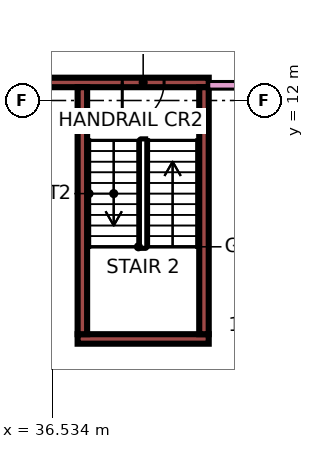
"""IFC4 building model, lengths in metres.
Left out: names, types, materials, properties, quantities, classifications, styles, units other than length and angle.
Written with IfcOpenShell. Run it as: python <this file> out.ifc"""

import sys

from ifc_helpers import new_model, si_unit, direction, frame, frame_2d, origin, place, context, subcontext, project, spatial, rectangle, extrude, element, fill, save


model = new_model("IFC4")
c1 = context("Model", 3, precision=1e-05, world=origin(), true_north=direction((0.0, 1.0)))
c2 = subcontext(c1, "Body", "Model", "MODEL_VIEW")
j1 = project(units=[si_unit("LENGTHUNIT", "METRE"), si_unit("PLANEANGLEUNIT", "RADIAN")], contexts=[c1])
p1 = place(None, origin())
s1 = spatial("IfcSite", under=j1, at=p1, CompositionType="ELEMENT")
p2 = place(p1, origin())
s2 = spatial("IfcBuilding", under=s1, at=p2, CompositionType="ELEMENT")
p3 = place(p2, frame((0.0, 0.0, 303.4)))
s3 = spatial("IfcBuildingStorey", under=s2, at=p3, CompositionType="ELEMENT", Elevation=303.4)
p4 = place(p3, frame((37.2, 5.725, 0.0), z_axis=(0.0, 0.0, 1.0), x_axis=(1.0, 0.0, 0.0)))
e1 = element("IfcWall", 1, at=p4, inside=s3, PredefinedType="SHEAR", context=c2, shape_type="SweptSolid", body=[
    extrude(rectangle(XDim=3.45, YDim=0.25, at=frame_2d((1.725, 0.0))), origin(), (0.0, 0.0, 1.0), 3.75),
])
p5 = place(p3, frame((36.4, 12.475, 0.0), z_axis=(0.0, 0.0, 1.0), x_axis=(1.0, 0.0, 0.0)))
e2 = element("IfcWall", 2, at=p5, inside=s3, PredefinedType="SHEAR", context=c2, shape_type="SweptSolid", body=[
    extrude(rectangle(XDim=4.25, YDim=0.25, at=frame_2d((2.125, 0.0))), origin(), (0.0, 0.0, 1.0), 3.75),
])
p6 = place(p5, frame((1.975, 0.0, 0.0)))
e3 = element("IfcOpeningElement", 3, at=p6, cuts=e2, PredefinedType="OPENING", context=c2, shape_type="SweptSolid", body=[
    extrude(rectangle(XDim=1.1, YDim=2.2, at=frame_2d((0.55, 1.1))), frame((0.0, 0.135, 0.0), z_axis=(0.0, -1.0, 0.0), x_axis=(1.0, 0.0, 0.0)), (0.0, 0.0, 1.0), 0.27),
])
for number, where, z_axis, x_axis in (
    (4, (37.325, 5.85, 0.0), (0.0, 0.0, 1.0), (0.0, 1.0, 0.0)),
    (5, (40.525, 5.85, 0.0), (0.0, 0.0, 1.0), (0.0, 1.0, 0.0)),
):
    element("IfcWall", number, at=place(p3, frame(where, z_axis=z_axis, x_axis=x_axis)), inside=s3, PredefinedType="SHEAR", context=c2, shape_type="SweptSolid", body=[
        extrude(rectangle(XDim=6.5, YDim=0.25, at=frame_2d((3.25, 0.0))), origin(), (0.0, 0.0, 1.0), 3.75),
    ])
p7 = place(p3, frame((40.65, 12.4, 0.0), z_axis=(0.0, 0.0, 1.0), x_axis=(1.0, 0.0, 0.0)))
e6 = element("IfcWall", 6, at=p7, inside=s3, PredefinedType="PARTITIONING", context=c2, shape_type="SweptSolid", body=[
    extrude(rectangle(XDim=22.35, YDim=0.2, at=frame_2d((11.175, 0.0))), origin(), (0.0, 0.0, 1.0), 3.35),
])
p8 = place(p7, frame((20.7, 0.0, 0.0)))
e7 = element("IfcOpeningElement", 7, at=p8, cuts=e6, PredefinedType="OPENING", context=c2, shape_type="SweptSolid", body=[
    extrude(rectangle(XDim=1.0, YDim=2.1, at=frame_2d((0.5, 1.05))), frame((0.0, 0.11, 0.0), z_axis=(0.0, -1.0, 0.0), x_axis=(1.0, 0.0, 0.0)), (0.0, 0.0, 1.0), 0.22),
])
p9 = place(p7, frame((1.05, 0.0, 0.0)))
e8 = element("IfcOpeningElement", 8, at=p9, cuts=e6, PredefinedType="OPENING", context=c2, shape_type="SweptSolid", body=[
    extrude(rectangle(XDim=1.0, YDim=2.1, at=frame_2d((0.5, 1.05))), frame((0.0, 0.11, 0.0), z_axis=(0.0, -1.0, 0.0), x_axis=(1.0, 0.0, 0.0)), (0.0, 0.0, 1.0), 0.22),
])
p10 = place(p6, frame((1.1, 0.0, 0.0), z_axis=(0.0, 0.0, 1.0), x_axis=(-1.0, 0.0, 0.0)))
e9 = element("IfcDoor", 9, at=p10, inside=s3, OperationType="SINGLE_SWING_LEFT", PredefinedType="DOOR", context=c2, shape_type="SweptSolid", body=[
    extrude(rectangle(XDim=1.1, YDim=2.2, at=frame_2d((0.55, 1.1))), frame((0.0, 0.025, 0.0), z_axis=(0.0, -1.0, 0.0), x_axis=(1.0, 0.0, 0.0)), (0.0, 0.0, 1.0), 0.05),
])
fill(e3, e9)
save(model, sys.argv[1])
